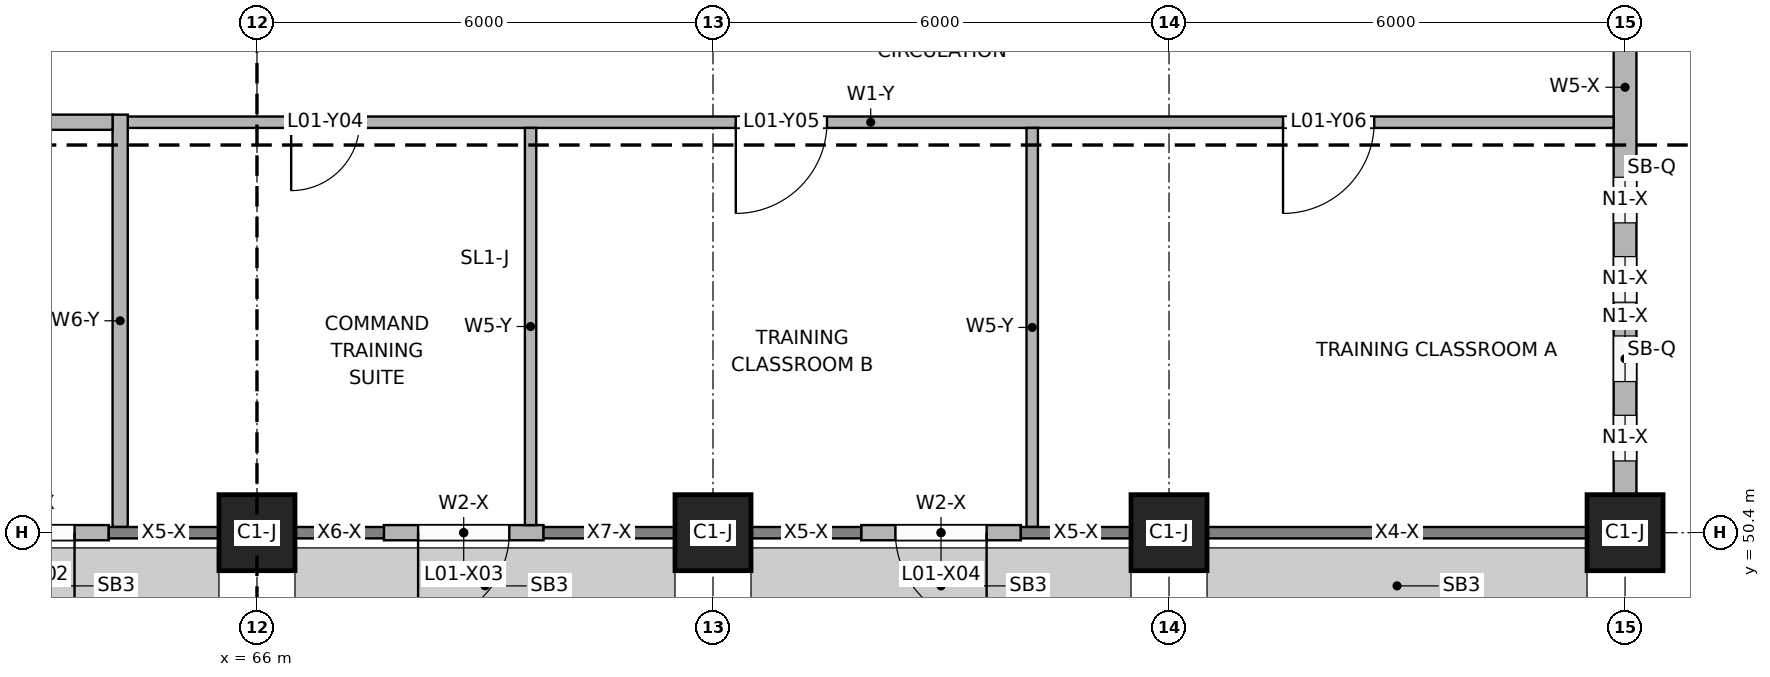
"""IFC4 building model, lengths in metres.
Left out: names, types, materials, properties, quantities, classifications, styles, units other than length and angle.
Written with IfcOpenShell. Run it as: python <this file> out.ifc"""

import sys

from ifc_helpers import new_model, si_unit, direction, frame, frame_2d, origin, origin_2d, place, context, subcontext, project, spatial, rectangle, extrude, element, fill, save


model = new_model("IFC4")
c1 = context("Model", 3, precision=1e-05, world=origin(), true_north=direction((0.0, 1.0)))
c2 = subcontext(c1, "Body", "Model", "MODEL_VIEW")
j1 = project(units=[si_unit("LENGTHUNIT", "METRE"), si_unit("PLANEANGLEUNIT", "RADIAN")], contexts=[c1])
p1 = place(None, origin())
s1 = spatial("IfcSite", under=j1, at=p1, CompositionType="ELEMENT")
p2 = place(p1, origin())
s2 = spatial("IfcBuilding", under=s1, at=p2, CompositionType="ELEMENT")
p3 = place(p2, frame((0.0, 0.0, 4.2)))
s3 = spatial("IfcBuildingStorey", under=s2, at=p3, CompositionType="ELEMENT", Elevation=4.2)
for number, where, z_axis, x_axis in (
    (1, (66.0, 50.4, 0.0), (0.0, 0.0, 1.0), (1.0, 0.0, 0.0)),
    (2, (72.0, 50.4, 0.0), (0.0, 0.0, 1.0), (1.0, 0.0, 0.0)),
    (3, (78.0, 50.4, 0.0), (0.0, 0.0, 1.0), (1.0, 0.0, 0.0)),
    (4, (84.0, 50.4, 0.0), (0.0, 0.0, 1.0), (1.0, 0.0, 0.0)),
):
    element("IfcColumn", number, at=place(p3, frame(where, z_axis=z_axis, x_axis=x_axis)), inside=s3, PredefinedType="COLUMN", context=c2, shape_type="SweptSolid", body=[
        extrude(rectangle(XDim=1.0, YDim=1.0, at=origin_2d()), origin(), (0.0, 0.0, 1.0), 3.95),
    ])
p4 = place(p3, frame((61.95, 50.4, 0.0), z_axis=(0.0, 0.0, 1.0), x_axis=(1.0, 0.0, 0.0)))
e5 = element("IfcWall", 5, at=p4, inside=s3, PredefinedType="SOLIDWALL", context=c2, shape_type="SweptSolid", body=[
    extrude(rectangle(XDim=2.1, YDim=0.2, at=frame_2d((1.05, 0.0))), origin(), (0.0, 0.0, 1.0), 3.15),
])
p5 = place(p4, frame((0.45, 0.0, 0.0)))
e6 = element("IfcOpeningElement", 6, at=p5, cuts=e5, PredefinedType="OPENING", context=c2, shape_type="SweptSolid", body=[
    extrude(rectangle(XDim=1.2, YDim=2.4, at=frame_2d((0.6, 1.2))), frame((0.0, 0.11, 0.0), z_axis=(0.0, -1.0, 0.0), x_axis=(1.0, 0.0, 0.0)), (0.0, 0.0, 1.0), 0.22),
])
p6 = place(p3, frame((67.67, 50.4, 0.0), z_axis=(0.0, 0.0, 1.0), x_axis=(1.0, 0.0, 0.0)))
e7 = element("IfcWall", 7, at=p6, inside=s3, PredefinedType="SOLIDWALL", context=c2, shape_type="SweptSolid", body=[
    extrude(rectangle(XDim=2.1, YDim=0.2, at=frame_2d((1.05, 0.0))), origin(), (0.0, 0.0, 1.0), 3.15),
])
p7 = place(p6, frame((0.45, 0.0, 0.0)))
e8 = element("IfcOpeningElement", 8, at=p7, cuts=e7, PredefinedType="OPENING", context=c2, shape_type="SweptSolid", body=[
    extrude(rectangle(XDim=1.2, YDim=2.4, at=frame_2d((0.6, 1.2))), frame((0.0, 0.11, 0.0), z_axis=(0.0, -1.0, 0.0), x_axis=(1.0, 0.0, 0.0)), (0.0, 0.0, 1.0), 0.22),
])
p8 = place(p3, frame((73.95, 50.4, 0.0), z_axis=(0.0, 0.0, 1.0), x_axis=(1.0, 0.0, 0.0)))
e9 = element("IfcWall", 9, at=p8, inside=s3, PredefinedType="SOLIDWALL", context=c2, shape_type="SweptSolid", body=[
    extrude(rectangle(XDim=2.1, YDim=0.2, at=frame_2d((1.05, 0.0))), origin(), (0.0, 0.0, 1.0), 3.15),
])
p9 = place(p8, frame((0.45, 0.0, 0.0)))
e10 = element("IfcOpeningElement", 10, at=p9, cuts=e9, PredefinedType="OPENING", context=c2, shape_type="SweptSolid", body=[
    extrude(rectangle(XDim=1.2, YDim=2.4, at=frame_2d((0.6, 1.2))), frame((0.0, 0.11, 0.0), z_axis=(0.0, -1.0, 0.0), x_axis=(1.0, 0.0, 0.0)), (0.0, 0.0, 1.0), 0.22),
])
p10 = place(p3, frame((84.0, 50.9, 0.0), z_axis=(0.0, 0.0, 1.0), x_axis=(0.0, 1.0, 0.0)))
e11 = element("IfcWall", 11, at=p10, inside=s3, PredefinedType="SOLIDWALL", context=c2, shape_type="SweptSolid", body=[
    extrude(rectangle(XDim=6.7, YDim=0.3, at=frame_2d((3.35, 0.0))), origin(), (0.0, 0.0, 1.0), 3.05),
])
p11 = place(p10, frame((0.444, 0.0, 0.9)))
e12 = element("IfcOpeningElement", 12, at=p11, cuts=e11, PredefinedType="OPENING", context=c2, shape_type="SweptSolid", body=[
    extrude(rectangle(XDim=0.6, YDim=1.9, at=frame_2d((0.3, 0.95))), frame((0.0, 0.16, 0.0), z_axis=(0.0, -1.0, 0.0), x_axis=(1.0, 0.0, 0.0)), (0.0, 0.0, 1.0), 0.32),
])
p12 = place(p10, frame((1.488, 0.0, 0.9)))
e13 = element("IfcOpeningElement", 13, at=p12, cuts=e11, PredefinedType="OPENING", context=c2, shape_type="SweptSolid", body=[
    extrude(rectangle(XDim=0.6, YDim=1.9, at=frame_2d((0.3, 0.95))), frame((0.0, 0.16, 0.0), z_axis=(0.0, -1.0, 0.0), x_axis=(1.0, 0.0, 0.0)), (0.0, 0.0, 1.0), 0.32),
])
p13 = place(p10, frame((2.532, 0.0, 0.9)))
e14 = element("IfcOpeningElement", 14, at=p13, cuts=e11, PredefinedType="OPENING", context=c2, shape_type="SweptSolid", body=[
    extrude(rectangle(XDim=0.6, YDim=1.9, at=frame_2d((0.3, 0.95))), frame((0.0, 0.16, 0.0), z_axis=(0.0, -1.0, 0.0), x_axis=(1.0, 0.0, 0.0)), (0.0, 0.0, 1.0), 0.32),
])
p14 = place(p10, frame((3.576, 0.0, 0.9)))
e15 = element("IfcOpeningElement", 15, at=p14, cuts=e11, PredefinedType="OPENING", context=c2, shape_type="SweptSolid", body=[
    extrude(rectangle(XDim=0.6, YDim=1.9, at=frame_2d((0.3, 0.95))), frame((0.0, 0.16, 0.0), z_axis=(0.0, -1.0, 0.0), x_axis=(1.0, 0.0, 0.0)), (0.0, 0.0, 1.0), 0.32),
])
p15 = place(p3, frame((64.2, 50.475, 0.0), z_axis=(0.0, 0.0, 1.0), x_axis=(0.0, 1.0, 0.0)))
e16 = element("IfcWall", 16, at=p15, inside=s3, PredefinedType="PARTITIONING", context=c2, shape_type="SweptSolid", body=[
    extrude(rectangle(XDim=5.425, YDim=0.2, at=frame_2d((2.712, 0.0))), origin(), (0.0, 0.0, 1.0), 3.15),
])
p16 = place(p3, frame((69.6, 50.5, 0.0), z_axis=(0.0, 0.0, 1.0), x_axis=(0.0, 1.0, 0.0)))
e17 = element("IfcWall", 17, at=p16, inside=s3, PredefinedType="PARTITIONING", context=c2, shape_type="SweptSolid", body=[
    extrude(rectangle(XDim=5.225, YDim=0.15, at=frame_2d((2.613, 0.0))), origin(), (0.0, 0.0, 1.0), 3.15),
])
p17 = place(p3, frame((76.2, 50.475, 0.0), z_axis=(0.0, 0.0, 1.0), x_axis=(0.0, 1.0, 0.0)))
e18 = element("IfcWall", 18, at=p17, inside=s3, PredefinedType="PARTITIONING", context=c2, shape_type="SweptSolid", body=[
    extrude(rectangle(XDim=5.25, YDim=0.15, at=frame_2d((2.625, 0.0))), origin(), (0.0, 0.0, 1.0), 3.15),
])
p18 = place(p3, frame((60.1, 55.8, 0.0), z_axis=(0.0, 0.0, 1.0), x_axis=(1.0, 0.0, 0.0)))
e19 = element("IfcWall", 19, at=p18, inside=s3, PredefinedType="PARTITIONING", context=c2, shape_type="SweptSolid", body=[
    extrude(rectangle(XDim=4.0, YDim=0.2, at=frame_2d((2.0, 0.0))), origin(), (0.0, 0.0, 1.0), 3.05),
])
p19 = place(p18, frame((1.55, 0.0, 0.0)))
e20 = element("IfcOpeningElement", 20, at=p19, cuts=e19, PredefinedType="OPENING", context=c2, shape_type="SweptSolid", body=[
    extrude(rectangle(XDim=0.9, YDim=2.1, at=frame_2d((0.45, 1.05))), frame((0.0, 0.11, 0.0), z_axis=(0.0, -1.0, 0.0), x_axis=(1.0, 0.0, 0.0)), (0.0, 0.0, 1.0), 0.22),
])
p20 = place(p3, frame((64.3, 55.8, 0.0), z_axis=(0.0, 0.0, 1.0), x_axis=(1.0, 0.0, 0.0)))
e21 = element("IfcWall", 21, at=p20, inside=s3, PredefinedType="PARTITIONING", context=c2, shape_type="SweptSolid", body=[
    extrude(rectangle(XDim=19.55, YDim=0.15, at=frame_2d((9.775, 0.0))), origin(), (0.0, 0.0, 1.0), 3.05),
])
p21 = place(p20, frame((2.15, 0.0, 0.0)))
e22 = element("IfcOpeningElement", 22, at=p21, cuts=e21, PredefinedType="OPENING", context=c2, shape_type="SweptSolid", body=[
    extrude(rectangle(XDim=0.9, YDim=2.1, at=frame_2d((0.45, 1.05))), frame((0.0, 0.085, 0.0), z_axis=(0.0, -1.0, 0.0), x_axis=(1.0, 0.0, 0.0)), (0.0, 0.0, 1.0), 0.17),
])
p22 = place(p20, frame((8.0, 0.0, 0.0)))
e23 = element("IfcOpeningElement", 23, at=p22, cuts=e21, PredefinedType="OPENING", context=c2, shape_type="SweptSolid", body=[
    extrude(rectangle(XDim=1.2, YDim=2.1, at=frame_2d((0.6, 1.05))), frame((0.0, 0.085, 0.0), z_axis=(0.0, -1.0, 0.0), x_axis=(1.0, 0.0, 0.0)), (0.0, 0.0, 1.0), 0.17),
])
p23 = place(p20, frame((15.2, 0.0, 0.0)))
e24 = element("IfcOpeningElement", 24, at=p23, cuts=e21, PredefinedType="OPENING", context=c2, shape_type="SweptSolid", body=[
    extrude(rectangle(XDim=1.2, YDim=2.1, at=frame_2d((0.6, 1.05))), frame((0.0, 0.085, 0.0), z_axis=(0.0, -1.0, 0.0), x_axis=(1.0, 0.0, 0.0)), (0.0, 0.0, 1.0), 0.17),
])
p24 = place(p5, frame((1.2, 0.0, 0.0), z_axis=(0.0, 0.0, 1.0), x_axis=(-1.0, 0.0, 0.0)))
e25 = element("IfcDoor", 25, at=p24, inside=s3, OperationType="SINGLE_SWING_LEFT", PredefinedType="DOOR", context=c2, shape_type="SweptSolid", body=[
    extrude(rectangle(XDim=1.2, YDim=2.4, at=frame_2d((0.6, 1.2))), frame((0.0, 0.025, 0.0), z_axis=(0.0, -1.0, 0.0), x_axis=(1.0, 0.0, 0.0)), (0.0, 0.0, 1.0), 0.05),
])
fill(e6, e25)
p25 = place(p7, frame((1.2, 0.0, 0.0), z_axis=(0.0, 0.0, 1.0), x_axis=(-1.0, 0.0, 0.0)))
e26 = element("IfcDoor", 26, at=p25, inside=s3, OperationType="SINGLE_SWING_RIGHT", PredefinedType="DOOR", context=c2, shape_type="SweptSolid", body=[
    extrude(rectangle(XDim=1.2, YDim=2.4, at=frame_2d((0.6, 1.2))), frame((0.0, 0.025, 0.0), z_axis=(0.0, -1.0, 0.0), x_axis=(1.0, 0.0, 0.0)), (0.0, 0.0, 1.0), 0.05),
])
fill(e8, e26)
p26 = place(p9, frame((1.2, 0.0, 0.0), z_axis=(0.0, 0.0, 1.0), x_axis=(-1.0, 0.0, 0.0)))
e27 = element("IfcDoor", 27, at=p26, inside=s3, OperationType="SINGLE_SWING_LEFT", PredefinedType="DOOR", context=c2, shape_type="SweptSolid", body=[
    extrude(rectangle(XDim=1.2, YDim=2.4, at=frame_2d((0.6, 1.2))), frame((0.0, 0.025, 0.0), z_axis=(0.0, -1.0, 0.0), x_axis=(1.0, 0.0, 0.0)), (0.0, 0.0, 1.0), 0.05),
])
fill(e10, e27)
p27 = place(p11, origin())
e28 = element("IfcWindow", 28, at=p27, inside=s3, PartitioningType="SINGLE_PANEL", PredefinedType="WINDOW", context=c2, shape_type="SweptSolid", body=[
    extrude(rectangle(XDim=0.6, YDim=1.9, at=frame_2d((0.3, 0.95))), frame((0.0, 0.03, 0.0), z_axis=(0.0, -1.0, 0.0), x_axis=(1.0, 0.0, 0.0)), (0.0, 0.0, 1.0), 0.06),
])
fill(e12, e28)
p28 = place(p12, origin())
e29 = element("IfcWindow", 29, at=p28, inside=s3, PartitioningType="SINGLE_PANEL", PredefinedType="WINDOW", context=c2, shape_type="SweptSolid", body=[
    extrude(rectangle(XDim=0.6, YDim=1.9, at=frame_2d((0.3, 0.95))), frame((0.0, 0.03, 0.0), z_axis=(0.0, -1.0, 0.0), x_axis=(1.0, 0.0, 0.0)), (0.0, 0.0, 1.0), 0.06),
])
fill(e13, e29)
p29 = place(p13, origin())
e30 = element("IfcWindow", 30, at=p29, inside=s3, PartitioningType="SINGLE_PANEL", PredefinedType="WINDOW", context=c2, shape_type="SweptSolid", body=[
    extrude(rectangle(XDim=0.6, YDim=1.9, at=frame_2d((0.3, 0.95))), frame((0.0, 0.03, 0.0), z_axis=(0.0, -1.0, 0.0), x_axis=(1.0, 0.0, 0.0)), (0.0, 0.0, 1.0), 0.06),
])
fill(e14, e30)
p30 = place(p14, origin())
e31 = element("IfcWindow", 31, at=p30, inside=s3, PartitioningType="SINGLE_PANEL", PredefinedType="WINDOW", context=c2, shape_type="SweptSolid", body=[
    extrude(rectangle(XDim=0.6, YDim=1.9, at=frame_2d((0.3, 0.95))), frame((0.0, 0.03, 0.0), z_axis=(0.0, -1.0, 0.0), x_axis=(1.0, 0.0, 0.0)), (0.0, 0.0, 1.0), 0.06),
])
fill(e15, e31)
p31 = place(p21, frame((0.9, 0.0, 0.0), z_axis=(0.0, 0.0, 1.0), x_axis=(-1.0, 0.0, 0.0)))
e32 = element("IfcDoor", 32, at=p31, inside=s3, OperationType="SINGLE_SWING_RIGHT", PredefinedType="DOOR", context=c2, shape_type="SweptSolid", body=[
    extrude(rectangle(XDim=0.9, YDim=2.1, at=frame_2d((0.45, 1.05))), frame((0.0, 0.025, 0.0), z_axis=(0.0, -1.0, 0.0), x_axis=(1.0, 0.0, 0.0)), (0.0, 0.0, 1.0), 0.05),
])
fill(e22, e32)
p32 = place(p22, frame((1.2, 0.0, 0.0), z_axis=(0.0, 0.0, 1.0), x_axis=(-1.0, 0.0, 0.0)))
e33 = element("IfcDoor", 33, at=p32, inside=s3, OperationType="SINGLE_SWING_RIGHT", PredefinedType="DOOR", context=c2, shape_type="SweptSolid", body=[
    extrude(rectangle(XDim=1.2, YDim=2.1, at=frame_2d((0.6, 1.05))), frame((0.0, 0.025, 0.0), z_axis=(0.0, -1.0, 0.0), x_axis=(1.0, 0.0, 0.0)), (0.0, 0.0, 1.0), 0.05),
])
fill(e23, e33)
p33 = place(p23, frame((1.2, 0.0, 0.0), z_axis=(0.0, 0.0, 1.0), x_axis=(-1.0, 0.0, 0.0)))
e34 = element("IfcDoor", 34, at=p33, inside=s3, OperationType="SINGLE_SWING_RIGHT", PredefinedType="DOOR", context=c2, shape_type="SweptSolid", body=[
    extrude(rectangle(XDim=1.2, YDim=2.1, at=frame_2d((0.6, 1.05))), frame((0.0, 0.025, 0.0), z_axis=(0.0, -1.0, 0.0), x_axis=(1.0, 0.0, 0.0)), (0.0, 0.0, 1.0), 0.05),
])
fill(e24, e34)
save(model, sys.argv[1])
